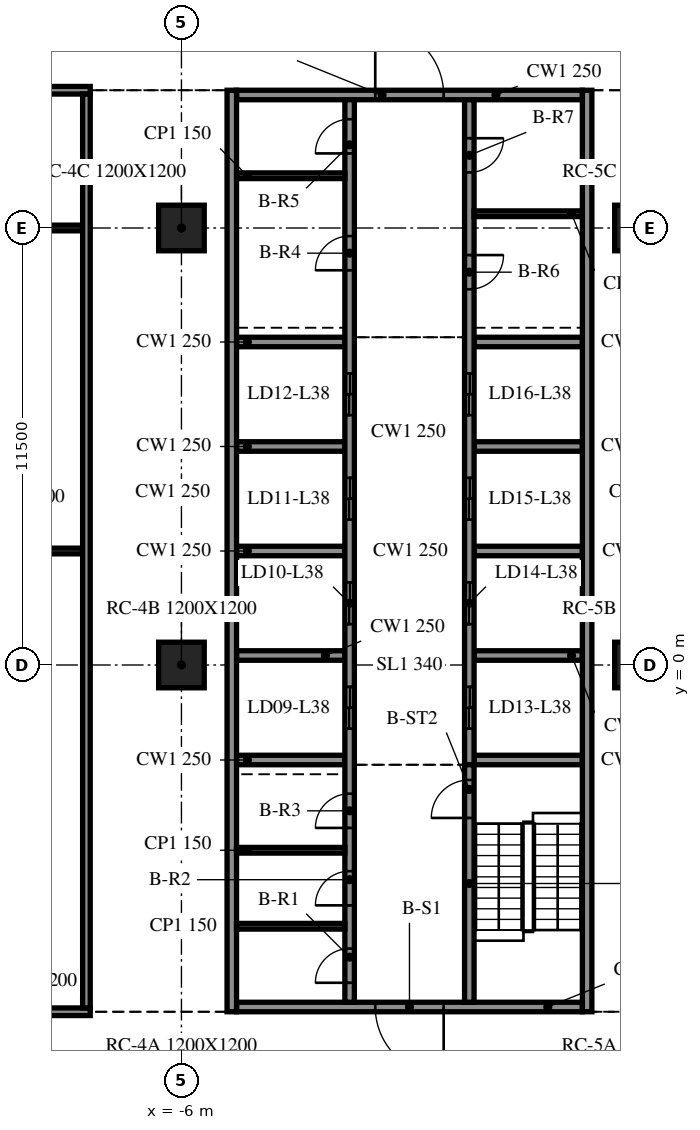
"""IFC4 building model, lengths in metres.
Left out: names, types, materials, properties, quantities, classifications, styles, units other than length and angle.
Written with IfcOpenShell. Run it as: python <this file> out.ifc"""

import sys

from ifc_helpers import new_model, si_unit, direction, frame, frame_2d, origin, origin_2d, place, context, subcontext, project, spatial, rectangle, extrude, element, fill, save


model = new_model("IFC4")
c1 = context("Model", 3, precision=1e-05, world=origin(), true_north=direction((0.0, 1.0)))
c2 = subcontext(c1, "Body", "Model", "MODEL_VIEW")
j1 = project(units=[si_unit("LENGTHUNIT", "METRE"), si_unit("PLANEANGLEUNIT", "RADIAN")], contexts=[c1])
p1 = place(None, origin())
s1 = spatial("IfcSite", under=j1, at=p1, CompositionType="ELEMENT")
p2 = place(p1, origin())
s2 = spatial("IfcBuilding", under=s1, at=p2, CompositionType="ELEMENT")
p3 = place(p2, frame((0.0, 0.0, 163.0)))
s3 = spatial("IfcBuildingStorey", under=s2, at=p3, CompositionType="ELEMENT", Elevation=163.0)
for number, where, z_axis, x_axis in (
    (1, (-6.0, 0.0, -0.34), (0.0, 0.0, 1.0), (1.0, 0.0, 0.0)),
    (2, (-6.0, 11.5, -0.34), (0.0, 0.0, 1.0), (1.0, 0.0, 0.0)),
    (3, (6.0, 0.0, -0.34), (0.0, 0.0, 1.0), (1.0, 0.0, 0.0)),
    (4, (6.0, 11.5, -0.34), (0.0, 0.0, 1.0), (1.0, 0.0, 0.0)),
):
    element("IfcColumn", number, at=place(p3, frame(where, z_axis=z_axis, x_axis=x_axis)), inside=s3, PredefinedType="COLUMN", context=c2, shape_type="SweptSolid", body=[
        extrude(rectangle(XDim=1.2, YDim=1.2, at=origin_2d()), origin(), (0.0, 0.0, 1.0), 3.8),
    ])
for number, where, z_axis, x_axis in (
    (5, (-4.675, 15.125, 0.0), (0.0, 0.0, 1.0), (0.0, -1.0, 0.0)),
    (6, (4.675, -9.125, 0.0), (0.0, 0.0, 1.0), (0.0, 1.0, 0.0)),
):
    element("IfcWall", number, at=place(p3, frame(where, z_axis=z_axis, x_axis=x_axis)), inside=s3, PredefinedType="SOLIDWALL", context=c2, shape_type="SweptSolid", body=[
        extrude(rectangle(XDim=24.25, YDim=0.25, at=frame_2d((12.125, 0.0))), origin(), (0.0, 0.0, 1.0), 3.46),
    ])
p4 = place(p3, frame((4.55, -9.0, 0.0), z_axis=(0.0, 0.0, 1.0), x_axis=(-1.0, 0.0, 0.0)))
e7 = element("IfcWall", 7, at=p4, inside=s3, PredefinedType="SOLIDWALL", context=c2, shape_type="SweptSolid", body=[
    extrude(rectangle(XDim=9.1, YDim=0.25, at=frame_2d((4.55, 0.0))), origin(), (0.0, 0.0, 1.0), 3.46),
])
p5 = place(p4, frame((3.65, 0.0, 0.0)))
e8 = element("IfcOpeningElement", 8, at=p5, cuts=e7, PredefinedType="OPENING", context=c2, shape_type="SweptSolid", body=[
    extrude(rectangle(XDim=1.8, YDim=2.1, at=frame_2d((0.9, 1.05))), frame((0.0, 0.135, 0.0), z_axis=(0.0, -1.0, 0.0), x_axis=(1.0, 0.0, 0.0)), (0.0, 0.0, 1.0), 0.27),
])
p6 = place(p3, frame((-4.55, 15.0, 0.0), z_axis=(0.0, 0.0, 1.0), x_axis=(1.0, 0.0, 0.0)))
e9 = element("IfcWall", 9, at=p6, inside=s3, PredefinedType="SOLIDWALL", context=c2, shape_type="SweptSolid", body=[
    extrude(rectangle(XDim=9.1, YDim=0.25, at=frame_2d((4.55, 0.0))), origin(), (0.0, 0.0, 1.0), 3.46),
])
p7 = place(p6, frame((3.65, 0.0, 0.0)))
e10 = element("IfcOpeningElement", 10, at=p7, cuts=e9, PredefinedType="OPENING", context=c2, shape_type="SweptSolid", body=[
    extrude(rectangle(XDim=1.8, YDim=2.1, at=frame_2d((0.9, 1.05))), frame((0.0, 0.135, 0.0), z_axis=(0.0, -1.0, 0.0), x_axis=(1.0, 0.0, 0.0)), (0.0, 0.0, 1.0), 0.27),
])
p8 = place(p3, frame((-1.575, -8.875, 0.0), z_axis=(0.0, 0.0, 1.0), x_axis=(0.0, 1.0, 0.0)))
e11 = element("IfcWall", 11, at=p8, inside=s3, PredefinedType="SOLIDWALL", context=c2, shape_type="SweptSolid", body=[
    extrude(rectangle(XDim=23.75, YDim=0.25, at=frame_2d((11.875, 0.0))), origin(), (0.0, 0.0, 1.0), 3.46),
])
p9 = place(p8, frame((7.2, 0.0, 0.0)))
e12 = element("IfcOpeningElement", 12, at=p9, cuts=e11, PredefinedType="OPENING", context=c2, shape_type="SweptSolid", body=[
    extrude(rectangle(XDim=1.1, YDim=2.1, at=frame_2d((0.55, 1.05))), frame((0.0, 0.135, 0.0), z_axis=(0.0, -1.0, 0.0), x_axis=(1.0, 0.0, 0.0)), (0.0, 0.0, 1.0), 0.27),
])
p10 = place(p8, frame((9.95, 0.0, 0.0)))
e13 = element("IfcOpeningElement", 13, at=p10, cuts=e11, PredefinedType="OPENING", context=c2, shape_type="SweptSolid", body=[
    extrude(rectangle(XDim=1.1, YDim=2.1, at=frame_2d((0.55, 1.05))), frame((0.0, 0.135, 0.0), z_axis=(0.0, -1.0, 0.0), x_axis=(1.0, 0.0, 0.0)), (0.0, 0.0, 1.0), 0.27),
])
p11 = place(p8, frame((12.7, 0.0, 0.0)))
e14 = element("IfcOpeningElement", 14, at=p11, cuts=e11, PredefinedType="OPENING", context=c2, shape_type="SweptSolid", body=[
    extrude(rectangle(XDim=1.1, YDim=2.1, at=frame_2d((0.55, 1.05))), frame((0.0, 0.135, 0.0), z_axis=(0.0, -1.0, 0.0), x_axis=(1.0, 0.0, 0.0)), (0.0, 0.0, 1.0), 0.27),
])
p12 = place(p8, frame((15.45, 0.0, 0.0)))
e15 = element("IfcOpeningElement", 15, at=p12, cuts=e11, PredefinedType="OPENING", context=c2, shape_type="SweptSolid", body=[
    extrude(rectangle(XDim=1.1, YDim=2.1, at=frame_2d((0.55, 1.05))), frame((0.0, 0.135, 0.0), z_axis=(0.0, -1.0, 0.0), x_axis=(1.0, 0.0, 0.0)), (0.0, 0.0, 1.0), 0.27),
])
p13 = place(p8, frame((0.512, 0.0, 0.0)))
e16 = element("IfcOpeningElement", 16, at=p13, cuts=e11, PredefinedType="OPENING", context=c2, shape_type="SweptSolid", body=[
    extrude(rectangle(XDim=0.9, YDim=2.1, at=frame_2d((0.45, 1.05))), frame((0.0, 0.135, 0.0), z_axis=(0.0, -1.0, 0.0), x_axis=(1.0, 0.0, 0.0)), (0.0, 0.0, 1.0), 0.27),
])
p14 = place(p8, frame((2.55, 0.0, 0.0)))
e17 = element("IfcOpeningElement", 17, at=p14, cuts=e11, PredefinedType="OPENING", context=c2, shape_type="SweptSolid", body=[
    extrude(rectangle(XDim=0.9, YDim=2.1, at=frame_2d((0.45, 1.05))), frame((0.0, 0.135, 0.0), z_axis=(0.0, -1.0, 0.0), x_axis=(1.0, 0.0, 0.0)), (0.0, 0.0, 1.0), 0.27),
])
p15 = place(p8, frame((4.587, 0.0, 0.0)))
e18 = element("IfcOpeningElement", 18, at=p15, cuts=e11, PredefinedType="OPENING", context=c2, shape_type="SweptSolid", body=[
    extrude(rectangle(XDim=0.9, YDim=2.1, at=frame_2d((0.45, 1.05))), frame((0.0, 0.135, 0.0), z_axis=(0.0, -1.0, 0.0), x_axis=(1.0, 0.0, 0.0)), (0.0, 0.0, 1.0), 0.27),
])
p16 = place(p8, frame((19.262, 0.0, 0.0)))
e19 = element("IfcOpeningElement", 19, at=p16, cuts=e11, PredefinedType="OPENING", context=c2, shape_type="SweptSolid", body=[
    extrude(rectangle(XDim=0.9, YDim=2.1, at=frame_2d((0.45, 1.05))), frame((0.0, 0.135, 0.0), z_axis=(0.0, -1.0, 0.0), x_axis=(1.0, 0.0, 0.0)), (0.0, 0.0, 1.0), 0.27),
])
p17 = place(p8, frame((22.337, 0.0, 0.0)))
e20 = element("IfcOpeningElement", 20, at=p17, cuts=e11, PredefinedType="OPENING", context=c2, shape_type="SweptSolid", body=[
    extrude(rectangle(XDim=0.9, YDim=2.1, at=frame_2d((0.45, 1.05))), frame((0.0, 0.135, 0.0), z_axis=(0.0, -1.0, 0.0), x_axis=(1.0, 0.0, 0.0)), (0.0, 0.0, 1.0), 0.27),
])
p18 = place(p3, frame((1.575, -8.875, 0.0), z_axis=(0.0, 0.0, 1.0), x_axis=(0.0, 1.0, 0.0)))
e21 = element("IfcWall", 21, at=p18, inside=s3, PredefinedType="SOLIDWALL", context=c2, shape_type="SweptSolid", body=[
    extrude(rectangle(XDim=6.25, YDim=0.25, at=frame_2d((3.125, 0.0))), origin(), (0.0, 0.0, 1.0), 3.46),
])
p19 = place(p18, frame((4.85, 0.0, 0.0)))
e22 = element("IfcOpeningElement", 22, at=p19, cuts=e21, PredefinedType="OPENING", context=c2, shape_type="SweptSolid", body=[
    extrude(rectangle(XDim=1.0, YDim=2.1, at=frame_2d((0.5, 1.05))), frame((0.0, 0.135, 0.0), z_axis=(0.0, -1.0, 0.0), x_axis=(1.0, 0.0, 0.0)), (0.0, 0.0, 1.0), 0.27),
])
p20 = place(p3, frame((1.575, 14.875, 0.0), z_axis=(0.0, 0.0, 1.0), x_axis=(0.0, -1.0, 0.0)))
e23 = element("IfcWall", 23, at=p20, inside=s3, PredefinedType="SOLIDWALL", context=c2, shape_type="SweptSolid", body=[
    extrude(rectangle(XDim=17.5, YDim=0.25, at=frame_2d((8.75, 0.0))), origin(), (0.0, 0.0, 1.0), 3.46),
])
p21 = place(p20, frame((15.45, 0.0, 0.0)))
e24 = element("IfcOpeningElement", 24, at=p21, cuts=e23, PredefinedType="OPENING", context=c2, shape_type="SweptSolid", body=[
    extrude(rectangle(XDim=1.1, YDim=2.1, at=frame_2d((0.55, 1.05))), frame((0.0, 0.135, 0.0), z_axis=(0.0, -1.0, 0.0), x_axis=(1.0, 0.0, 0.0)), (0.0, 0.0, 1.0), 0.27),
])
p22 = place(p20, frame((12.7, 0.0, 0.0)))
e25 = element("IfcOpeningElement", 25, at=p22, cuts=e23, PredefinedType="OPENING", context=c2, shape_type="SweptSolid", body=[
    extrude(rectangle(XDim=1.1, YDim=2.1, at=frame_2d((0.55, 1.05))), frame((0.0, 0.135, 0.0), z_axis=(0.0, -1.0, 0.0), x_axis=(1.0, 0.0, 0.0)), (0.0, 0.0, 1.0), 0.27),
])
p23 = place(p20, frame((9.95, 0.0, 0.0)))
e26 = element("IfcOpeningElement", 26, at=p23, cuts=e23, PredefinedType="OPENING", context=c2, shape_type="SweptSolid", body=[
    extrude(rectangle(XDim=1.1, YDim=2.1, at=frame_2d((0.55, 1.05))), frame((0.0, 0.135, 0.0), z_axis=(0.0, -1.0, 0.0), x_axis=(1.0, 0.0, 0.0)), (0.0, 0.0, 1.0), 0.27),
])
p24 = place(p20, frame((7.2, 0.0, 0.0)))
e27 = element("IfcOpeningElement", 27, at=p24, cuts=e23, PredefinedType="OPENING", context=c2, shape_type="SweptSolid", body=[
    extrude(rectangle(XDim=1.1, YDim=2.1, at=frame_2d((0.55, 1.05))), frame((0.0, 0.135, 0.0), z_axis=(0.0, -1.0, 0.0), x_axis=(1.0, 0.0, 0.0)), (0.0, 0.0, 1.0), 0.27),
])
p25 = place(p20, frame((4.087, 0.0, 0.0)))
e28 = element("IfcOpeningElement", 28, at=p25, cuts=e23, PredefinedType="OPENING", context=c2, shape_type="SweptSolid", body=[
    extrude(rectangle(XDim=0.9, YDim=2.1, at=frame_2d((0.45, 1.05))), frame((0.0, 0.135, 0.0), z_axis=(0.0, -1.0, 0.0), x_axis=(1.0, 0.0, 0.0)), (0.0, 0.0, 1.0), 0.27),
])
p26 = place(p20, frame((1.012, 0.0, 0.0)))
e29 = element("IfcOpeningElement", 29, at=p26, cuts=e23, PredefinedType="OPENING", context=c2, shape_type="SweptSolid", body=[
    extrude(rectangle(XDim=0.9, YDim=2.1, at=frame_2d((0.45, 1.05))), frame((0.0, 0.135, 0.0), z_axis=(0.0, -1.0, 0.0), x_axis=(1.0, 0.0, 0.0)), (0.0, 0.0, 1.0), 0.27),
])
for number, where, z_axis, x_axis in (
    (30, (-4.55, -2.5, 0.0), (0.0, 0.0, 1.0), (1.0, 0.0, 0.0)),
    (31, (-4.55, 0.25, 0.0), (0.0, 0.0, 1.0), (1.0, 0.0, 0.0)),
    (32, (-4.55, 3.0, 0.0), (0.0, 0.0, 1.0), (1.0, 0.0, 0.0)),
    (33, (-4.55, 5.75, 0.0), (0.0, 0.0, 1.0), (1.0, 0.0, 0.0)),
    (34, (-4.55, 8.5, 0.0), (0.0, 0.0, 1.0), (1.0, 0.0, 0.0)),
    (35, (1.7, -2.5, 0.0), (0.0, 0.0, 1.0), (1.0, 0.0, 0.0)),
    (36, (1.7, 0.25, 0.0), (0.0, 0.0, 1.0), (1.0, 0.0, 0.0)),
    (37, (1.7, 3.0, 0.0), (0.0, 0.0, 1.0), (1.0, 0.0, 0.0)),
    (38, (1.7, 5.75, 0.0), (0.0, 0.0, 1.0), (1.0, 0.0, 0.0)),
    (39, (1.7, 8.5, 0.0), (0.0, 0.0, 1.0), (1.0, 0.0, 0.0)),
):
    element("IfcWall", number, at=place(p3, frame(where, z_axis=z_axis, x_axis=x_axis)), inside=s3, PredefinedType="SOLIDWALL", context=c2, shape_type="SweptSolid", body=[
        extrude(rectangle(XDim=2.85, YDim=0.25, at=frame_2d((1.425, 0.0))), origin(), (0.0, 0.0, 1.0), 3.46),
    ])
for number, where, z_axis, x_axis in (
    (40, (-4.55, -6.875, 0.0), (0.0, 0.0, 1.0), (1.0, 0.0, 0.0)),
    (41, (-4.55, -4.875, 0.0), (0.0, 0.0, 1.0), (1.0, 0.0, 0.0)),
    (42, (-4.55, 12.875, 0.0), (0.0, 0.0, 1.0), (1.0, 0.0, 0.0)),
    (43, (1.7, 11.875, 0.0), (0.0, 0.0, 1.0), (1.0, 0.0, 0.0)),
):
    element("IfcWall", number, at=place(p3, frame(where, z_axis=z_axis, x_axis=x_axis)), inside=s3, PredefinedType="PARTITIONING", context=c2, shape_type="SweptSolid", body=[
        extrude(rectangle(XDim=2.85, YDim=0.15, at=frame_2d((1.425, 0.0))), origin(), (0.0, 0.0, 1.0), 3.46),
    ])
p27 = place(p3, frame((-15.7, -9.125, 0.0), z_axis=(0.0, 0.0, 1.0), x_axis=(1.0, 0.0, 0.0)))
e44 = element("IfcWall", 44, at=p27, inside=s3, PredefinedType="PARTITIONING", context=c2, shape_type="SweptSolid", body=[
    extrude(rectangle(XDim=7.3, YDim=0.2, at=frame_2d((3.65, 0.0))), origin(), (0.0, 0.0, 1.0), 3.46),
])
p28 = place(p27, frame((3.1, 0.0, 0.0)))
e45 = element("IfcOpeningElement", 45, at=p28, cuts=e44, PredefinedType="OPENING", context=c2, shape_type="SweptSolid", body=[
    extrude(rectangle(XDim=0.9, YDim=2.1, at=frame_2d((0.45, 1.05))), frame((0.0, 0.11, 0.0), z_axis=(0.0, -1.0, 0.0), x_axis=(1.0, 0.0, 0.0)), (0.0, 0.0, 1.0), 0.22),
])
for number, where, z_axis, x_axis in (
    (46, (-15.5, 3.0, 0.0), (0.0, 0.0, 1.0), (1.0, 0.0, 0.0)),
    (47, (-15.5, 11.5, 0.0), (0.0, 0.0, 1.0), (1.0, 0.0, 0.0)),
):
    element("IfcWall", number, at=place(p3, frame(where, z_axis=z_axis, x_axis=x_axis)), inside=s3, PredefinedType="PARTITIONING", context=c2, shape_type="SweptSolid", body=[
        extrude(rectangle(XDim=6.9, YDim=0.15, at=frame_2d((3.45, 0.0))), origin(), (0.0, 0.0, 1.0), 3.46),
    ])
p29 = place(p3, frame((-15.7, 15.125, 0.0), z_axis=(0.0, 0.0, 1.0), x_axis=(1.0, 0.0, 0.0)))
e48 = element("IfcWall", 48, at=p29, inside=s3, PredefinedType="PARTITIONING", context=c2, shape_type="SweptSolid", body=[
    extrude(rectangle(XDim=7.3, YDim=0.2, at=frame_2d((3.65, 0.0))), origin(), (0.0, 0.0, 1.0), 3.46),
])
p30 = place(p29, frame((3.1, 0.0, 0.0)))
e49 = element("IfcOpeningElement", 49, at=p30, cuts=e48, PredefinedType="OPENING", context=c2, shape_type="SweptSolid", body=[
    extrude(rectangle(XDim=0.9, YDim=2.1, at=frame_2d((0.45, 1.05))), frame((0.0, 0.11, 0.0), z_axis=(0.0, -1.0, 0.0), x_axis=(1.0, 0.0, 0.0)), (0.0, 0.0, 1.0), 0.22),
])
p31 = place(p3, frame((-8.5, -9.025, 0.0), z_axis=(0.0, 0.0, 1.0), x_axis=(0.0, 1.0, 0.0)))
e50 = element("IfcWall", 50, at=p31, inside=s3, PredefinedType="PARTITIONING", context=c2, shape_type="SweptSolid", body=[
    extrude(rectangle(XDim=24.05, YDim=0.2, at=frame_2d((12.025, 0.0))), origin(), (0.0, 0.0, 1.0), 3.46),
])
p32 = place(p5, origin())
e51 = element("IfcDoor", 51, at=p32, inside=s3, OperationType="DOUBLE_DOOR_SINGLE_SWING", PredefinedType="DOOR", context=c2, shape_type="SweptSolid", body=[
    extrude(rectangle(XDim=1.8, YDim=2.1, at=frame_2d((0.9, 1.05))), frame((0.0, 0.025, 0.0), z_axis=(0.0, -1.0, 0.0), x_axis=(1.0, 0.0, 0.0)), (0.0, 0.0, 1.0), 0.05),
])
fill(e8, e51)
p33 = place(p7, origin())
e52 = element("IfcDoor", 52, at=p33, inside=s3, OperationType="DOUBLE_DOOR_SINGLE_SWING", PredefinedType="DOOR", context=c2, shape_type="SweptSolid", body=[
    extrude(rectangle(XDim=1.8, YDim=2.1, at=frame_2d((0.9, 1.05))), frame((0.0, 0.025, 0.0), z_axis=(0.0, -1.0, 0.0), x_axis=(1.0, 0.0, 0.0)), (0.0, 0.0, 1.0), 0.05),
])
fill(e10, e52)
p34 = place(p21, origin())
e53 = element("IfcDoor", 53, at=p34, inside=s3, OperationType="DOUBLE_DOOR_SLIDING", PredefinedType="DOOR", context=c2, shape_type="SweptSolid", body=[
    extrude(rectangle(XDim=1.1, YDim=2.1, at=frame_2d((0.55, 1.05))), frame((0.0, 0.025, 0.0), z_axis=(0.0, -1.0, 0.0), x_axis=(1.0, 0.0, 0.0)), (0.0, 0.0, 1.0), 0.05),
])
fill(e24, e53)
p35 = place(p22, origin())
e54 = element("IfcDoor", 54, at=p35, inside=s3, OperationType="DOUBLE_DOOR_SLIDING", PredefinedType="DOOR", context=c2, shape_type="SweptSolid", body=[
    extrude(rectangle(XDim=1.1, YDim=2.1, at=frame_2d((0.55, 1.05))), frame((0.0, 0.025, 0.0), z_axis=(0.0, -1.0, 0.0), x_axis=(1.0, 0.0, 0.0)), (0.0, 0.0, 1.0), 0.05),
])
fill(e25, e54)
p36 = place(p23, origin())
e55 = element("IfcDoor", 55, at=p36, inside=s3, OperationType="DOUBLE_DOOR_SLIDING", PredefinedType="DOOR", context=c2, shape_type="SweptSolid", body=[
    extrude(rectangle(XDim=1.1, YDim=2.1, at=frame_2d((0.55, 1.05))), frame((0.0, 0.025, 0.0), z_axis=(0.0, -1.0, 0.0), x_axis=(1.0, 0.0, 0.0)), (0.0, 0.0, 1.0), 0.05),
])
fill(e26, e55)
p37 = place(p24, origin())
e56 = element("IfcDoor", 56, at=p37, inside=s3, OperationType="DOUBLE_DOOR_SLIDING", PredefinedType="DOOR", context=c2, shape_type="SweptSolid", body=[
    extrude(rectangle(XDim=1.1, YDim=2.1, at=frame_2d((0.55, 1.05))), frame((0.0, 0.025, 0.0), z_axis=(0.0, -1.0, 0.0), x_axis=(1.0, 0.0, 0.0)), (0.0, 0.0, 1.0), 0.05),
])
fill(e27, e56)
p38 = place(p9, origin())
e57 = element("IfcDoor", 57, at=p38, inside=s3, OperationType="DOUBLE_DOOR_SLIDING", PredefinedType="DOOR", context=c2, shape_type="SweptSolid", body=[
    extrude(rectangle(XDim=1.1, YDim=2.1, at=frame_2d((0.55, 1.05))), frame((0.0, 0.025, 0.0), z_axis=(0.0, -1.0, 0.0), x_axis=(1.0, 0.0, 0.0)), (0.0, 0.0, 1.0), 0.05),
])
fill(e12, e57)
p39 = place(p10, origin())
e58 = element("IfcDoor", 58, at=p39, inside=s3, OperationType="DOUBLE_DOOR_SLIDING", PredefinedType="DOOR", context=c2, shape_type="SweptSolid", body=[
    extrude(rectangle(XDim=1.1, YDim=2.1, at=frame_2d((0.55, 1.05))), frame((0.0, 0.025, 0.0), z_axis=(0.0, -1.0, 0.0), x_axis=(1.0, 0.0, 0.0)), (0.0, 0.0, 1.0), 0.05),
])
fill(e13, e58)
p40 = place(p11, origin())
e59 = element("IfcDoor", 59, at=p40, inside=s3, OperationType="DOUBLE_DOOR_SLIDING", PredefinedType="DOOR", context=c2, shape_type="SweptSolid", body=[
    extrude(rectangle(XDim=1.1, YDim=2.1, at=frame_2d((0.55, 1.05))), frame((0.0, 0.025, 0.0), z_axis=(0.0, -1.0, 0.0), x_axis=(1.0, 0.0, 0.0)), (0.0, 0.0, 1.0), 0.05),
])
fill(e14, e59)
p41 = place(p12, origin())
e60 = element("IfcDoor", 60, at=p41, inside=s3, OperationType="DOUBLE_DOOR_SLIDING", PredefinedType="DOOR", context=c2, shape_type="SweptSolid", body=[
    extrude(rectangle(XDim=1.1, YDim=2.1, at=frame_2d((0.55, 1.05))), frame((0.0, 0.025, 0.0), z_axis=(0.0, -1.0, 0.0), x_axis=(1.0, 0.0, 0.0)), (0.0, 0.0, 1.0), 0.05),
])
fill(e15, e60)
p42 = place(p13, origin())
e61 = element("IfcDoor", 61, at=p42, inside=s3, OperationType="SINGLE_SWING_LEFT", PredefinedType="DOOR", context=c2, shape_type="SweptSolid", body=[
    extrude(rectangle(XDim=0.9, YDim=2.1, at=frame_2d((0.45, 1.05))), frame((0.0, 0.025, 0.0), z_axis=(0.0, -1.0, 0.0), x_axis=(1.0, 0.0, 0.0)), (0.0, 0.0, 1.0), 0.05),
])
fill(e16, e61)
p43 = place(p14, origin())
e62 = element("IfcDoor", 62, at=p43, inside=s3, OperationType="SINGLE_SWING_RIGHT", PredefinedType="DOOR", context=c2, shape_type="SweptSolid", body=[
    extrude(rectangle(XDim=0.9, YDim=2.1, at=frame_2d((0.45, 1.05))), frame((0.0, 0.025, 0.0), z_axis=(0.0, -1.0, 0.0), x_axis=(1.0, 0.0, 0.0)), (0.0, 0.0, 1.0), 0.05),
])
fill(e17, e62)
p44 = place(p15, origin())
e63 = element("IfcDoor", 63, at=p44, inside=s3, OperationType="SINGLE_SWING_LEFT", PredefinedType="DOOR", context=c2, shape_type="SweptSolid", body=[
    extrude(rectangle(XDim=0.9, YDim=2.1, at=frame_2d((0.45, 1.05))), frame((0.0, 0.025, 0.0), z_axis=(0.0, -1.0, 0.0), x_axis=(1.0, 0.0, 0.0)), (0.0, 0.0, 1.0), 0.05),
])
fill(e18, e63)
p45 = place(p16, origin())
e64 = element("IfcDoor", 64, at=p45, inside=s3, OperationType="SINGLE_SWING_RIGHT", PredefinedType="DOOR", context=c2, shape_type="SweptSolid", body=[
    extrude(rectangle(XDim=0.9, YDim=2.1, at=frame_2d((0.45, 1.05))), frame((0.0, 0.025, 0.0), z_axis=(0.0, -1.0, 0.0), x_axis=(1.0, 0.0, 0.0)), (0.0, 0.0, 1.0), 0.05),
])
fill(e19, e64)
p46 = place(p17, origin())
e65 = element("IfcDoor", 65, at=p46, inside=s3, OperationType="SINGLE_SWING_LEFT", PredefinedType="DOOR", context=c2, shape_type="SweptSolid", body=[
    extrude(rectangle(XDim=0.9, YDim=2.1, at=frame_2d((0.45, 1.05))), frame((0.0, 0.025, 0.0), z_axis=(0.0, -1.0, 0.0), x_axis=(1.0, 0.0, 0.0)), (0.0, 0.0, 1.0), 0.05),
])
fill(e20, e65)
p47 = place(p25, origin())
e66 = element("IfcDoor", 66, at=p47, inside=s3, OperationType="SINGLE_SWING_RIGHT", PredefinedType="DOOR", context=c2, shape_type="SweptSolid", body=[
    extrude(rectangle(XDim=0.9, YDim=2.1, at=frame_2d((0.45, 1.05))), frame((0.0, 0.025, 0.0), z_axis=(0.0, -1.0, 0.0), x_axis=(1.0, 0.0, 0.0)), (0.0, 0.0, 1.0), 0.05),
])
fill(e28, e66)
p48 = place(p26, origin())
e67 = element("IfcDoor", 67, at=p48, inside=s3, OperationType="SINGLE_SWING_LEFT", PredefinedType="DOOR", context=c2, shape_type="SweptSolid", body=[
    extrude(rectangle(XDim=0.9, YDim=2.1, at=frame_2d((0.45, 1.05))), frame((0.0, 0.025, 0.0), z_axis=(0.0, -1.0, 0.0), x_axis=(1.0, 0.0, 0.0)), (0.0, 0.0, 1.0), 0.05),
])
fill(e29, e67)
p49 = place(p19, origin())
e68 = element("IfcDoor", 68, at=p49, inside=s3, OperationType="SINGLE_SWING_RIGHT", PredefinedType="DOOR", context=c2, shape_type="SweptSolid", body=[
    extrude(rectangle(XDim=1.0, YDim=2.1, at=frame_2d((0.5, 1.05))), frame((0.0, 0.025, 0.0), z_axis=(0.0, -1.0, 0.0), x_axis=(1.0, 0.0, 0.0)), (0.0, 0.0, 1.0), 0.05),
])
fill(e22, e68)
save(model, sys.argv[1])
